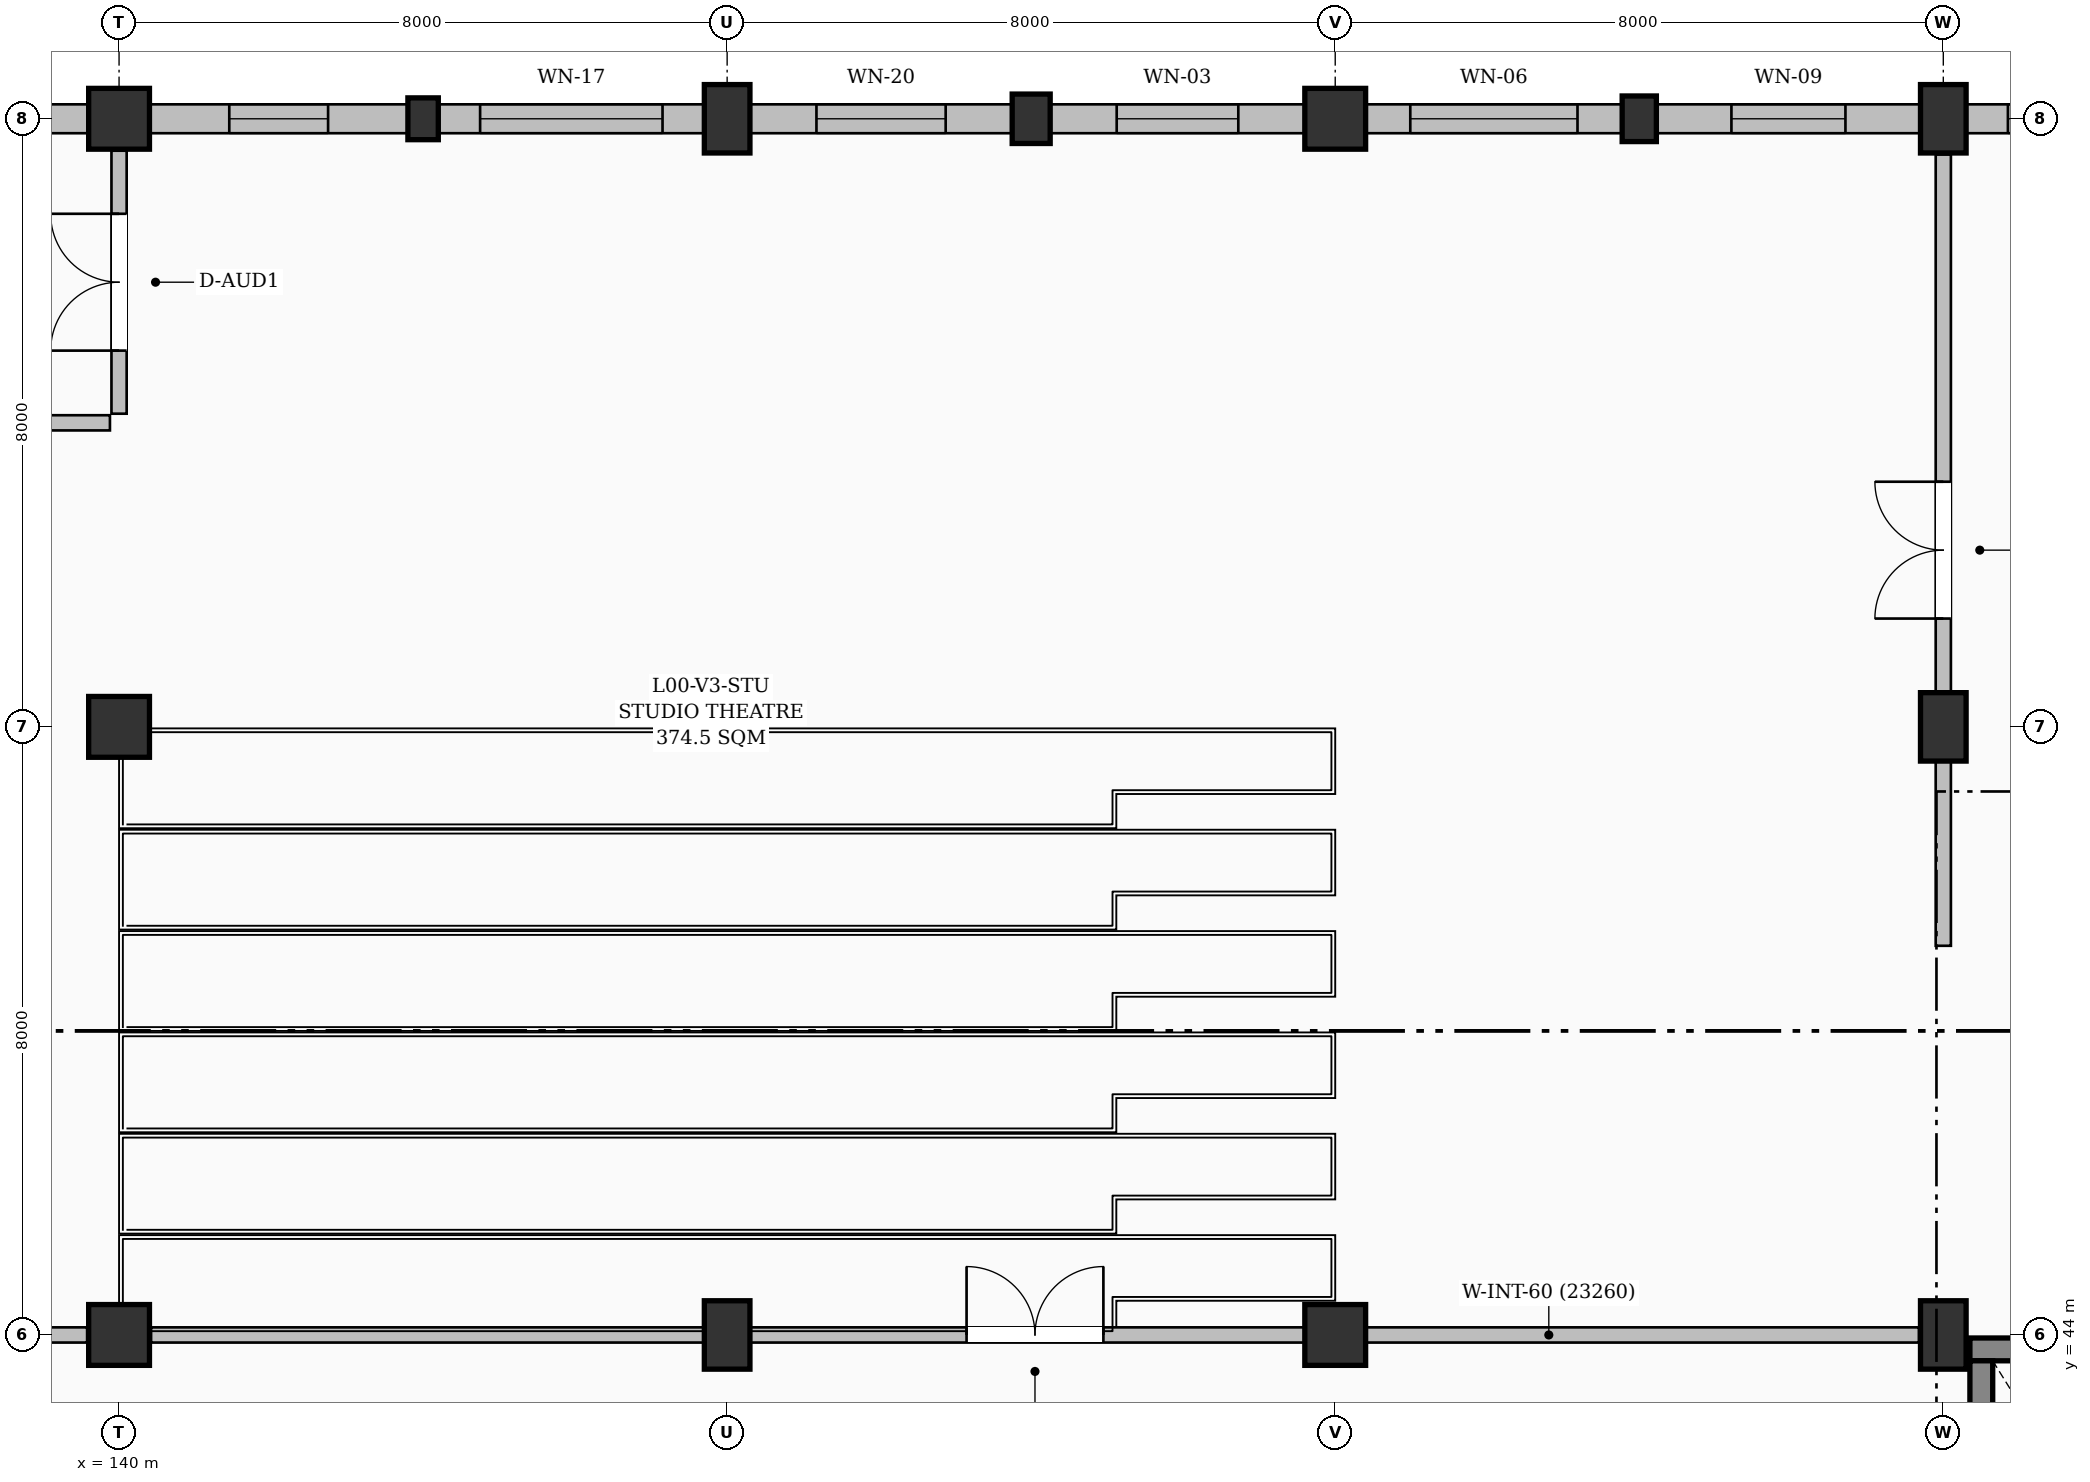
"""IFC4 building model, lengths in metres.
Left out: names, types, materials, properties, quantities, classifications, styles, units other than length and angle.
Written with IfcOpenShell. Run it as: python <this file> out.ifc"""

import sys

from ifc_helpers import new_model, si_unit, direction, frame, frame_2d, origin, origin_2d, place, context, subcontext, project, spatial, rectangle, extrude, element, fill, save


model = new_model("IFC4")
c1 = context("Model", 3, precision=1e-05, world=origin(), true_north=direction((0.0, 1.0)))
c2 = subcontext(c1, "Body", "Model", "MODEL_VIEW")
j1 = project(units=[si_unit("LENGTHUNIT", "METRE"), si_unit("PLANEANGLEUNIT", "RADIAN")], contexts=[c1])
p1 = place(None, origin())
s1 = spatial("IfcSite", under=j1, at=p1, CompositionType="ELEMENT")
p2 = place(p1, origin())
s2 = spatial("IfcBuilding", under=s1, at=p2, CompositionType="ELEMENT")
p3 = place(p2, origin())
s3 = spatial("IfcBuildingStorey", under=s2, at=p3, CompositionType="ELEMENT", Elevation=0.0)
for number, where, z_axis, x_axis in (
    (1, (140.0, 44.0, 0.0), (0.0, 0.0, 1.0), (1.0, 0.0, 0.0)),
    (2, (140.0, 52.0, 0.0), (0.0, 0.0, 1.0), (1.0, 0.0, 0.0)),
    (3, (140.0, 60.0, 0.0), (0.0, 0.0, 1.0), (1.0, 0.0, 0.0)),
):
    element("IfcColumn", number, at=place(p3, frame(where, z_axis=z_axis, x_axis=x_axis)), inside=s3, PredefinedType="COLUMN", context=c2, shape_type="SweptSolid", body=[
        extrude(rectangle(XDim=0.8, YDim=0.8, at=origin_2d()), origin(), (0.0, 0.0, 1.0), 4.8),
    ])
p4 = place(p3, frame((144.0, 60.0, 0.0), z_axis=(0.0, 0.0, 1.0), x_axis=(1.0, 0.0, 0.0)))
e4 = element("IfcColumn", 4, at=p4, inside=s3, PredefinedType="PILASTER", context=c2, shape_type="SweptSolid", body=[
    extrude(rectangle(XDim=0.4, YDim=0.55, at=origin_2d()), origin(), (0.0, 0.0, 1.0), 4.8),
])
for number, where, z_axis, x_axis in (
    (5, (148.0, 44.0, 0.0), (0.0, 0.0, 1.0), (1.0, 0.0, 0.0)),
    (6, (148.0, 60.0, 0.0), (0.0, 0.0, 1.0), (1.0, 0.0, 0.0)),
):
    element("IfcColumn", number, at=place(p3, frame(where, z_axis=z_axis, x_axis=x_axis)), inside=s3, PredefinedType="COLUMN", context=c2, shape_type="SweptSolid", body=[
        extrude(rectangle(XDim=0.6, YDim=0.9, at=origin_2d()), origin(), (0.0, 0.0, 1.0), 4.8),
    ])
p5 = place(p3, frame((152.0, 60.0, 0.0), z_axis=(0.0, 0.0, 1.0), x_axis=(1.0, 0.0, 0.0)))
e7 = element("IfcColumn", 7, at=p5, inside=s3, PredefinedType="PILASTER", context=c2, shape_type="SweptSolid", body=[
    extrude(rectangle(XDim=0.5, YDim=0.65, at=origin_2d()), origin(), (0.0, 0.0, 1.0), 4.8),
])
for number, where, z_axis, x_axis in (
    (8, (156.0, 44.0, 0.0), (0.0, 0.0, 1.0), (1.0, 0.0, 0.0)),
    (9, (156.0, 60.0, 0.0), (0.0, 0.0, 1.0), (1.0, 0.0, 0.0)),
):
    element("IfcColumn", number, at=place(p3, frame(where, z_axis=z_axis, x_axis=x_axis)), inside=s3, PredefinedType="COLUMN", context=c2, shape_type="SweptSolid", body=[
        extrude(rectangle(XDim=0.8, YDim=0.8, at=origin_2d()), origin(), (0.0, 0.0, 1.0), 4.8),
    ])
p6 = place(p3, frame((160.0, 60.0, 0.0), z_axis=(0.0, 0.0, 1.0), x_axis=(1.0, 0.0, 0.0)))
e10 = element("IfcColumn", 10, at=p6, inside=s3, PredefinedType="PILASTER", context=c2, shape_type="SweptSolid", body=[
    extrude(rectangle(XDim=0.45, YDim=0.6, at=origin_2d()), origin(), (0.0, 0.0, 1.0), 4.8),
])
for number, where, z_axis, x_axis in (
    (11, (164.0, 44.0, 0.0), (0.0, 0.0, 1.0), (1.0, 0.0, 0.0)),
    (12, (164.0, 52.0, 0.0), (0.0, 0.0, 1.0), (1.0, 0.0, 0.0)),
    (13, (164.0, 60.0, 0.0), (0.0, 0.0, 1.0), (1.0, 0.0, 0.0)),
):
    element("IfcColumn", number, at=place(p3, frame(where, z_axis=z_axis, x_axis=x_axis)), inside=s3, PredefinedType="COLUMN", context=c2, shape_type="SweptSolid", body=[
        extrude(rectangle(XDim=0.6, YDim=0.9, at=origin_2d()), origin(), (0.0, 0.0, 1.0), 4.8),
    ])
p7 = place(p3, frame((136.225, 60.0, 0.0), z_axis=(0.0, 0.0, 1.0), x_axis=(1.0, 0.0, 0.0)))
e14 = element("IfcWall", 14, at=p7, inside=s3, PredefinedType="SOLIDWALL", context=c2, shape_type="SweptSolid", body=[
    extrude(rectangle(XDim=3.375, YDim=0.38, at=frame_2d((1.688, 0.0))), origin(), (0.0, 0.0, 1.0), 4.035),
])
p8 = place(p7, frame((0.637, 0.0, 0.95)))
e15 = element("IfcOpeningElement", 15, at=p8, cuts=e14, PredefinedType="OPENING", context=c2, shape_type="SweptSolid", body=[
    extrude(rectangle(XDim=2.1, YDim=1.5, at=frame_2d((1.05, 0.75))), frame((0.0, 0.2, 0.0), z_axis=(0.0, -1.0, 0.0), x_axis=(1.0, 0.0, 0.0)), (0.0, 0.0, 1.0), 0.4),
])
p9 = place(p3, frame((140.4, 60.0, 0.0), z_axis=(0.0, 0.0, 1.0), x_axis=(1.0, 0.0, 0.0)))
e16 = element("IfcWall", 16, at=p9, inside=s3, PredefinedType="SOLIDWALL", context=c2, shape_type="SweptSolid", body=[
    extrude(rectangle(XDim=3.4, YDim=0.38, at=frame_2d((1.7, 0.0))), origin(), (0.0, 0.0, 1.0), 3.985),
])
p10 = place(p9, frame((1.05, 0.0, 0.95)))
e17 = element("IfcOpeningElement", 17, at=p10, cuts=e16, PredefinedType="OPENING", context=c2, shape_type="SweptSolid", body=[
    extrude(rectangle(XDim=1.3, YDim=1.4, at=frame_2d((0.65, 0.7))), frame((0.0, 0.2, 0.0), z_axis=(0.0, -1.0, 0.0), x_axis=(1.0, 0.0, 0.0)), (0.0, 0.0, 1.0), 0.4),
])
p11 = place(p3, frame((144.2, 60.0, 0.0), z_axis=(0.0, 0.0, 1.0), x_axis=(1.0, 0.0, 0.0)))
e18 = element("IfcWall", 18, at=p11, inside=s3, PredefinedType="SOLIDWALL", context=c2, shape_type="SweptSolid", body=[
    extrude(rectangle(XDim=3.5, YDim=0.38, at=frame_2d((1.75, 0.0))), origin(), (0.0, 0.0, 1.0), 3.985),
])
p12 = place(p11, frame((0.55, 0.0, 0.95)))
e19 = element("IfcOpeningElement", 19, at=p12, cuts=e18, PredefinedType="OPENING", context=c2, shape_type="SweptSolid", body=[
    extrude(rectangle(XDim=2.4, YDim=1.2, at=frame_2d((1.2, 0.6))), frame((0.0, 0.2, 0.0), z_axis=(0.0, -1.0, 0.0), x_axis=(1.0, 0.0, 0.0)), (0.0, 0.0, 1.0), 0.4),
])
p13 = place(p3, frame((148.3, 60.0, 0.0), z_axis=(0.0, 0.0, 1.0), x_axis=(1.0, 0.0, 0.0)))
e20 = element("IfcWall", 20, at=p13, inside=s3, PredefinedType="SOLIDWALL", context=c2, shape_type="SweptSolid", body=[
    extrude(rectangle(XDim=3.45, YDim=0.38, at=frame_2d((1.725, 0.0))), origin(), (0.0, 0.0, 1.0), 3.935),
])
p14 = place(p13, frame((0.875, 0.0, 0.95)))
e21 = element("IfcOpeningElement", 21, at=p14, cuts=e20, PredefinedType="OPENING", context=c2, shape_type="SweptSolid", body=[
    extrude(rectangle(XDim=1.7, YDim=2.0, at=frame_2d((0.85, 1.0))), frame((0.0, 0.2, 0.0), z_axis=(0.0, -1.0, 0.0), x_axis=(1.0, 0.0, 0.0)), (0.0, 0.0, 1.0), 0.4),
])
p15 = place(p3, frame((152.25, 60.0, 0.0), z_axis=(0.0, 0.0, 1.0), x_axis=(1.0, 0.0, 0.0)))
e22 = element("IfcWall", 22, at=p15, inside=s3, PredefinedType="SOLIDWALL", context=c2, shape_type="SweptSolid", body=[
    extrude(rectangle(XDim=3.35, YDim=0.38, at=frame_2d((1.675, 0.0))), origin(), (0.0, 0.0, 1.0), 3.935),
])
p16 = place(p15, frame((0.875, 0.0, 0.95)))
e23 = element("IfcOpeningElement", 23, at=p16, cuts=e22, PredefinedType="OPENING", context=c2, shape_type="SweptSolid", body=[
    extrude(rectangle(XDim=1.6, YDim=1.8, at=frame_2d((0.8, 0.9))), frame((0.0, 0.2, 0.0), z_axis=(0.0, -1.0, 0.0), x_axis=(1.0, 0.0, 0.0)), (0.0, 0.0, 1.0), 0.4),
])
p17 = place(p3, frame((156.4, 60.0, 0.0), z_axis=(0.0, 0.0, 1.0), x_axis=(1.0, 0.0, 0.0)))
e24 = element("IfcWall", 24, at=p17, inside=s3, PredefinedType="SOLIDWALL", context=c2, shape_type="SweptSolid", body=[
    extrude(rectangle(XDim=3.375, YDim=0.38, at=frame_2d((1.688, 0.0))), origin(), (0.0, 0.0, 1.0), 4.235),
])
p18 = place(p17, frame((0.587, 0.0, 0.95)))
e25 = element("IfcOpeningElement", 25, at=p18, cuts=e24, PredefinedType="OPENING", context=c2, shape_type="SweptSolid", body=[
    extrude(rectangle(XDim=2.2, YDim=1.8, at=frame_2d((1.1, 0.9))), frame((0.0, 0.2, 0.0), z_axis=(0.0, -1.0, 0.0), x_axis=(1.0, 0.0, 0.0)), (0.0, 0.0, 1.0), 0.4),
])
p19 = place(p3, frame((160.225, 60.0, 0.0), z_axis=(0.0, 0.0, 1.0), x_axis=(1.0, 0.0, 0.0)))
e26 = element("IfcWall", 26, at=p19, inside=s3, PredefinedType="SOLIDWALL", context=c2, shape_type="SweptSolid", body=[
    extrude(rectangle(XDim=3.475, YDim=0.38, at=frame_2d((1.737, 0.0))), origin(), (0.0, 0.0, 1.0), 4.235),
])
p20 = place(p19, frame((0.988, 0.0, 0.95)))
e27 = element("IfcOpeningElement", 27, at=p20, cuts=e26, PredefinedType="OPENING", context=c2, shape_type="SweptSolid", body=[
    extrude(rectangle(XDim=1.5, YDim=1.5, at=frame_2d((0.75, 0.75))), frame((0.0, 0.2, 0.0), z_axis=(0.0, -1.0, 0.0), x_axis=(1.0, 0.0, 0.0)), (0.0, 0.0, 1.0), 0.4),
])
p21 = place(p3, frame((164.3, 60.0, 0.0), z_axis=(0.0, 0.0, 1.0), x_axis=(1.0, 0.0, 0.0)))
e28 = element("IfcWall", 28, at=p21, inside=s3, PredefinedType="SOLIDWALL", context=c2, shape_type="SweptSolid", body=[
    extrude(rectangle(XDim=3.5, YDim=0.38, at=frame_2d((1.75, 0.0))), origin(), (0.0, 0.0, 1.0), 4.035),
])
p22 = place(p21, frame((0.55, 0.0, 0.95)))
e29 = element("IfcOpeningElement", 29, at=p22, cuts=e28, PredefinedType="OPENING", context=c2, shape_type="SweptSolid", body=[
    extrude(rectangle(XDim=2.4, YDim=1.5, at=frame_2d((1.2, 0.75))), frame((0.0, 0.2, 0.0), z_axis=(0.0, -1.0, 0.0), x_axis=(1.0, 0.0, 0.0)), (0.0, 0.0, 1.0), 0.4),
])
p23 = place(p3, frame((168.45, 43.81, 0.0), z_axis=(0.0, 0.0, 1.0), x_axis=(-1.0, 0.0, 0.0)))
e30 = element("IfcWall", 30, at=p23, inside=s3, PredefinedType="SHEAR", context=c2, shape_type="SweptSolid", body=[
    extrude(rectangle(XDim=4.1, YDim=0.3, at=frame_2d((2.05, 0.0))), origin(), (0.0, 0.0, 1.0), 4.55),
])
p24 = place(p3, frame((164.5, 36.34, 0.0), z_axis=(0.0, 0.0, 1.0), x_axis=(0.0, 1.0, 0.0)))
e31 = element("IfcWall", 31, at=p24, inside=s3, PredefinedType="SHEAR", context=c2, shape_type="SweptSolid", body=[
    extrude(rectangle(XDim=7.32, YDim=0.3, at=frame_2d((3.66, 0.0))), origin(), (0.0, 0.0, 1.0), 4.55),
])
p25 = place(p24, frame((0.35, 0.0, 0.0)))
e32 = element("IfcOpeningElement", 32, at=p25, cuts=e31, PredefinedType="OPENING", context=c2, shape_type="SweptSolid", body=[
    extrude(rectangle(XDim=1.2, YDim=2.15, at=frame_2d((0.6, 1.075))), frame((0.0, 0.16, 0.0), z_axis=(0.0, -1.0, 0.0), x_axis=(1.0, 0.0, 0.0)), (0.0, 0.0, 1.0), 0.32),
])
p26 = place(p3, frame((140.42, 44.0, 0.0), z_axis=(0.0, 0.0, 1.0), x_axis=(1.0, 0.0, 0.0)))
e33 = element("IfcWall", 33, at=p26, inside=s3, PredefinedType="PARTITIONING", context=c2, shape_type="SweptSolid", body=[
    extrude(rectangle(XDim=23.26, YDim=0.2, at=frame_2d((11.63, 0.0))), origin(), (0.0, 0.0, 1.0), 3.735),
])
p27 = place(p26, frame((10.73, 0.0, 0.0)))
e34 = element("IfcOpeningElement", 34, at=p27, cuts=e33, PredefinedType="OPENING", context=c2, shape_type="SweptSolid", body=[
    extrude(rectangle(XDim=1.8, YDim=2.35, at=frame_2d((0.9, 1.175))), frame((0.0, 0.11, 0.0), z_axis=(0.0, -1.0, 0.0), x_axis=(1.0, 0.0, 0.0)), (0.0, 0.0, 1.0), 0.22),
])
p28 = place(p3, frame((140.0, 56.12, 0.0), z_axis=(0.0, 0.0, 1.0), x_axis=(0.0, 1.0, 0.0)))
e35 = element("IfcWall", 35, at=p28, inside=s3, PredefinedType="PARTITIONING", context=c2, shape_type="SweptSolid", body=[
    extrude(rectangle(XDim=3.46, YDim=0.2, at=frame_2d((1.73, 0.0))), origin(), (0.0, 0.0, 1.0), 3.635),
])
p29 = place(p28, frame((0.83, 0.0, 0.0)))
e36 = element("IfcOpeningElement", 36, at=p29, cuts=e35, PredefinedType="OPENING", context=c2, shape_type="SweptSolid", body=[
    extrude(rectangle(XDim=1.8, YDim=2.35, at=frame_2d((0.9, 1.175))), frame((0.0, 0.11, 0.0), z_axis=(0.0, -1.0, 0.0), x_axis=(1.0, 0.0, 0.0)), (0.0, 0.0, 1.0), 0.22),
])
p30 = place(p3, frame((164.0, 49.12, 0.0), z_axis=(0.0, 0.0, 1.0), x_axis=(0.0, 1.0, 0.0)))
e37 = element("IfcWall", 37, at=p30, inside=s3, PredefinedType="PARTITIONING", context=c2, shape_type="SweptSolid", body=[
    extrude(rectangle(XDim=10.41, YDim=0.2, at=frame_2d((5.205, 0.0))), origin(), (0.0, 0.0, 1.0), 3.935),
])
p31 = place(p30, frame((4.305, 0.0, 0.0)))
e38 = element("IfcOpeningElement", 38, at=p31, cuts=e37, PredefinedType="OPENING", context=c2, shape_type="SweptSolid", body=[
    extrude(rectangle(XDim=1.8, YDim=2.35, at=frame_2d((0.9, 1.175))), frame((0.0, 0.11, 0.0), z_axis=(0.0, -1.0, 0.0), x_axis=(1.0, 0.0, 0.0)), (0.0, 0.0, 1.0), 0.22),
])
p32 = place(p3, frame((132.32, 44.0, 0.0), z_axis=(0.0, 0.0, 1.0), x_axis=(1.0, 0.0, 0.0)))
e39 = element("IfcWall", 39, at=p32, inside=s3, PredefinedType="PARTITIONING", context=c2, shape_type="SweptSolid", body=[
    extrude(rectangle(XDim=7.26, YDim=0.2, at=frame_2d((3.63, 0.0))), origin(), (0.0, 0.0, 1.0), 3.685),
])
p33 = place(p32, frame((2.73, 0.0, 0.0)))
e40 = element("IfcOpeningElement", 40, at=p33, cuts=e39, PredefinedType="OPENING", context=c2, shape_type="SweptSolid", body=[
    extrude(rectangle(XDim=1.8, YDim=2.35, at=frame_2d((0.9, 1.175))), frame((0.0, 0.11, 0.0), z_axis=(0.0, -1.0, 0.0), x_axis=(1.0, 0.0, 0.0)), (0.0, 0.0, 1.0), 0.22),
])
p34 = place(p3, frame((135.12, 56.0, 0.0), z_axis=(0.0, 0.0, 1.0), x_axis=(1.0, 0.0, 0.0)))
e41 = element("IfcWall", 41, at=p34, inside=s3, PredefinedType="PARTITIONING", context=c2, shape_type="SweptSolid", body=[
    extrude(rectangle(XDim=4.76, YDim=0.2, at=frame_2d((2.38, 0.0))), origin(), (0.0, 0.0, 1.0), 4.55),
])
p35 = place(p10, origin())
e42 = element("IfcWindow", 42, at=p35, inside=s3, PartitioningType="SINGLE_PANEL", PredefinedType="WINDOW", context=c2, shape_type="SweptSolid", body=[
    extrude(rectangle(XDim=1.3, YDim=1.4, at=frame_2d((0.65, 0.7))), frame((0.0, 0.03, 0.0), z_axis=(0.0, -1.0, 0.0), x_axis=(1.0, 0.0, 0.0)), (0.0, 0.0, 1.0), 0.06),
])
fill(e17, e42)
p36 = place(p12, origin())
e43 = element("IfcWindow", 43, at=p36, inside=s3, PartitioningType="TRIPLE_PANEL_HORIZONTAL", PredefinedType="WINDOW", context=c2, shape_type="SweptSolid", body=[
    extrude(rectangle(XDim=2.4, YDim=1.2, at=frame_2d((1.2, 0.6))), frame((0.0, 0.03, 0.0), z_axis=(0.0, -1.0, 0.0), x_axis=(1.0, 0.0, 0.0)), (0.0, 0.0, 1.0), 0.06),
])
fill(e19, e43)
p37 = place(p14, origin())
e44 = element("IfcWindow", 44, at=p37, inside=s3, PartitioningType="DOUBLE_PANEL_VERTICAL", PredefinedType="WINDOW", context=c2, shape_type="SweptSolid", body=[
    extrude(rectangle(XDim=1.7, YDim=2.0, at=frame_2d((0.85, 1.0))), frame((0.0, 0.03, 0.0), z_axis=(0.0, -1.0, 0.0), x_axis=(1.0, 0.0, 0.0)), (0.0, 0.0, 1.0), 0.06),
])
fill(e21, e44)
p38 = place(p16, origin())
e45 = element("IfcWindow", 45, at=p38, inside=s3, PartitioningType="DOUBLE_PANEL_VERTICAL", PredefinedType="WINDOW", context=c2, shape_type="SweptSolid", body=[
    extrude(rectangle(XDim=1.6, YDim=1.8, at=frame_2d((0.8, 0.9))), frame((0.0, 0.03, 0.0), z_axis=(0.0, -1.0, 0.0), x_axis=(1.0, 0.0, 0.0)), (0.0, 0.0, 1.0), 0.06),
])
fill(e23, e45)
p39 = place(p18, origin())
e46 = element("IfcWindow", 46, at=p39, inside=s3, PartitioningType="TRIPLE_PANEL_VERTICAL", PredefinedType="WINDOW", context=c2, shape_type="SweptSolid", body=[
    extrude(rectangle(XDim=2.2, YDim=1.8, at=frame_2d((1.1, 0.9))), frame((0.0, 0.03, 0.0), z_axis=(0.0, -1.0, 0.0), x_axis=(1.0, 0.0, 0.0)), (0.0, 0.0, 1.0), 0.06),
])
fill(e25, e46)
p40 = place(p20, origin())
e47 = element("IfcWindow", 47, at=p40, inside=s3, PartitioningType="DOUBLE_PANEL_VERTICAL", PredefinedType="WINDOW", context=c2, shape_type="SweptSolid", body=[
    extrude(rectangle(XDim=1.5, YDim=1.5, at=frame_2d((0.75, 0.75))), frame((0.0, 0.03, 0.0), z_axis=(0.0, -1.0, 0.0), x_axis=(1.0, 0.0, 0.0)), (0.0, 0.0, 1.0), 0.06),
])
fill(e27, e47)
p41 = place(p22, origin())
e48 = element("IfcWindow", 48, at=p41, inside=s3, PartitioningType="TRIPLE_PANEL_VERTICAL", PredefinedType="WINDOW", context=c2, shape_type="SweptSolid", body=[
    extrude(rectangle(XDim=2.4, YDim=1.5, at=frame_2d((1.2, 0.75))), frame((0.0, 0.03, 0.0), z_axis=(0.0, -1.0, 0.0), x_axis=(1.0, 0.0, 0.0)), (0.0, 0.0, 1.0), 0.06),
])
fill(e29, e48)
p42 = place(p27, origin())
e49 = element("IfcDoor", 49, at=p42, inside=s3, OperationType="DOUBLE_DOOR_SINGLE_SWING", PredefinedType="DOOR", context=c2, shape_type="SweptSolid", body=[
    extrude(rectangle(XDim=1.8, YDim=2.35, at=frame_2d((0.9, 1.175))), frame((0.0, 0.025, 0.0), z_axis=(0.0, -1.0, 0.0), x_axis=(1.0, 0.0, 0.0)), (0.0, 0.0, 1.0), 0.05),
])
fill(e34, e49)
p43 = place(p29, origin())
e50 = element("IfcDoor", 50, at=p43, inside=s3, OperationType="DOUBLE_DOOR_SINGLE_SWING", PredefinedType="DOOR", context=c2, shape_type="SweptSolid", body=[
    extrude(rectangle(XDim=1.8, YDim=2.35, at=frame_2d((0.9, 1.175))), frame((0.0, 0.025, 0.0), z_axis=(0.0, -1.0, 0.0), x_axis=(1.0, 0.0, 0.0)), (0.0, 0.0, 1.0), 0.05),
])
fill(e36, e50)
p44 = place(p31, origin())
e51 = element("IfcDoor", 51, at=p44, inside=s3, OperationType="DOUBLE_DOOR_SINGLE_SWING", PredefinedType="DOOR", context=c2, shape_type="SweptSolid", body=[
    extrude(rectangle(XDim=1.8, YDim=2.35, at=frame_2d((0.9, 1.175))), frame((0.0, 0.025, 0.0), z_axis=(0.0, -1.0, 0.0), x_axis=(1.0, 0.0, 0.0)), (0.0, 0.0, 1.0), 0.05),
])
fill(e38, e51)
save(model, sys.argv[1])
